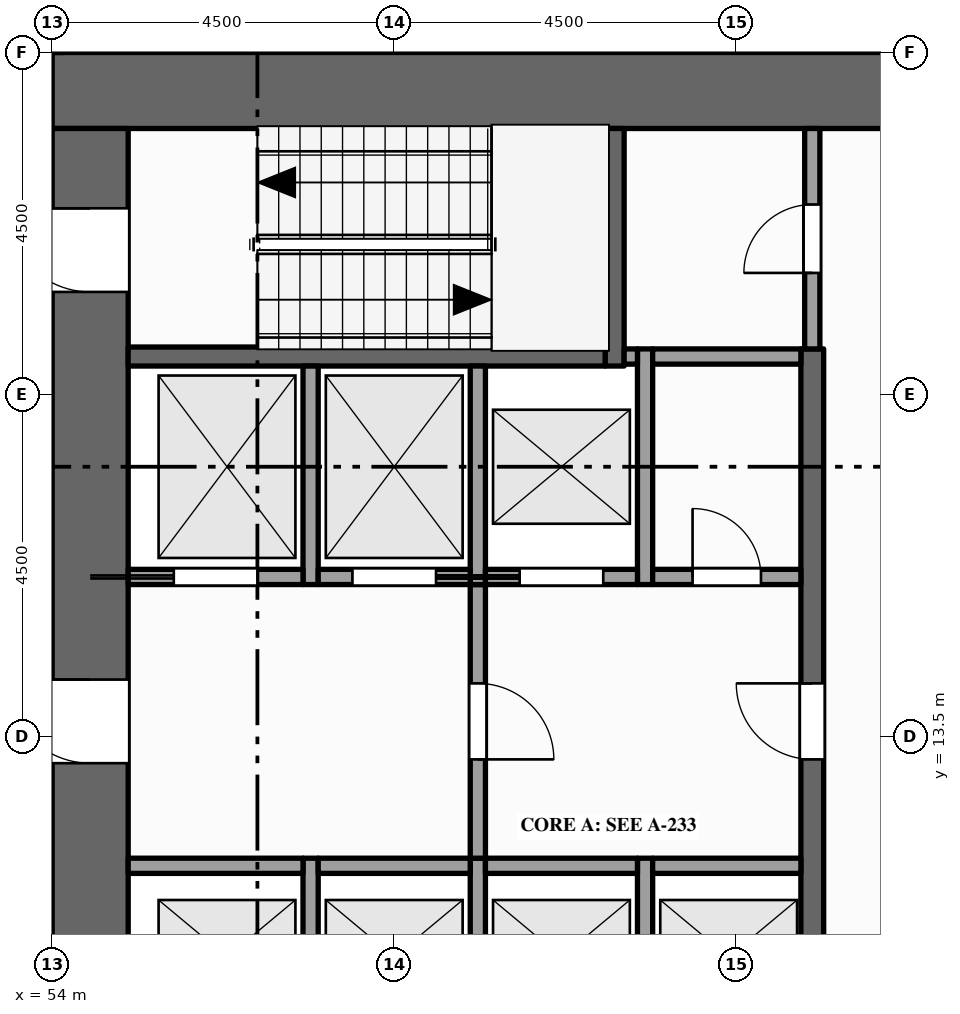
"""IFC4 building model, lengths in metres.
Left out: names, types, materials, properties, quantities, classifications, styles, units other than length and angle.
Written with IfcOpenShell. Run it as: python <this file> out.ifc"""

import sys

from ifc_helpers import new_model, si_unit, direction, frame, frame_2d, origin, place, context, subcontext, project, spatial, rectangle, extrude, element, fill, save


model = new_model("IFC4")
c1 = context("Model", 3, precision=1e-05, world=origin(), true_north=direction((0.0, 1.0)))
c2 = subcontext(c1, "Body", "Model", "MODEL_VIEW")
j1 = project(units=[si_unit("LENGTHUNIT", "METRE"), si_unit("PLANEANGLEUNIT", "RADIAN")], contexts=[c1])
p1 = place(None, origin())
s1 = spatial("IfcSite", under=j1, at=p1, CompositionType="ELEMENT")
p2 = place(p1, origin())
s2 = spatial("IfcBuilding", under=s1, at=p2, CompositionType="ELEMENT")
p3 = place(p2, frame((0.0, 0.0, 183.0)))
s3 = spatial("IfcBuildingStorey", under=s2, at=p3, CompositionType="ELEMENT", Elevation=183.0)
p4 = place(p3, frame((54.0, 22.0, -0.15), z_axis=(0.0, 0.0, 1.0), x_axis=(1.0, 0.0, 0.0)))
e1 = element("IfcWall", 1, at=p4, inside=s3, PredefinedType="SHEAR", context=c2, shape_type="SweptSolid", body=[
    extrude(rectangle(XDim=13.5, YDim=1.0, at=frame_2d((6.75, 0.0))), origin(), (0.0, 0.0, 1.0), 4.0),
])
p5 = place(p3, frame((54.5, 1.0, -0.15), z_axis=(0.0, 0.0, 1.0), x_axis=(0.0, 1.0, 0.0)))
e2 = element("IfcWall", 2, at=p5, inside=s3, PredefinedType="SHEAR", context=c2, shape_type="SweptSolid", body=[
    extrude(rectangle(XDim=20.5, YDim=1.0, at=frame_2d((10.25, 0.0))), origin(), (0.0, 0.0, 1.0), 4.0),
])
p6 = place(p5, frame((6.1, 0.0, 0.15)))
e3 = element("IfcOpeningElement", 3, at=p6, cuts=e2, PredefinedType="OPENING", context=c2, shape_type="SweptSolid", body=[
    extrude(rectangle(XDim=1.8, YDim=2.1, at=frame_2d((0.9, 1.05))), frame((0.0, 0.51, 0.0), z_axis=(0.0, -1.0, 0.0), x_axis=(1.0, 0.0, 0.0)), (0.0, 0.0, 1.0), 1.02),
])
p7 = place(p5, frame((12.15, 0.0, 0.15)))
e4 = element("IfcOpeningElement", 4, at=p7, cuts=e2, PredefinedType="OPENING", context=c2, shape_type="SweptSolid", body=[
    extrude(rectangle(XDim=1.1, YDim=2.1, at=frame_2d((0.55, 1.05))), frame((0.0, 0.51, 0.0), z_axis=(0.0, -1.0, 0.0), x_axis=(1.0, 0.0, 0.0)), (0.0, 0.0, 1.0), 1.02),
])
p8 = place(p5, frame((1.15, 0.0, 0.15)))
e5 = element("IfcOpeningElement", 5, at=p8, cuts=e2, PredefinedType="OPENING", context=c2, shape_type="SweptSolid", body=[
    extrude(rectangle(XDim=1.1, YDim=2.1, at=frame_2d((0.55, 1.05))), frame((0.0, 0.51, 0.0), z_axis=(0.0, -1.0, 0.0), x_axis=(1.0, 0.0, 0.0)), (0.0, 0.0, 1.0), 1.02),
])
p9 = place(p5, frame((18.35, 0.0, 0.15)))
e6 = element("IfcOpeningElement", 6, at=p9, cuts=e2, PredefinedType="OPENING", context=c2, shape_type="SweptSolid", body=[
    extrude(rectangle(XDim=1.1, YDim=2.1, at=frame_2d((0.55, 1.05))), frame((0.0, 0.51, 0.0), z_axis=(0.0, -1.0, 0.0), x_axis=(1.0, 0.0, 0.0)), (0.0, 0.0, 1.0), 1.02),
])
p10 = place(p3, frame((54.0, 22.5, 0.0), z_axis=(0.0, 0.0, 1.0), x_axis=(0.0, 1.0, 0.0)))
e7 = element("IfcWall", 7, at=p10, inside=s3, PredefinedType="STANDARD", context=c2, shape_type="SweptSolid", body=[
    extrude(rectangle(XDim=1.05, YDim=0.3, at=frame_2d((0.525, 0.0))), origin(), (0.0, 0.0, 1.0), 3.049),
])
p11 = place(p3, frame((57.4, 9.3, 0.0), z_axis=(0.0, 0.0, 1.0), x_axis=(0.0, 1.0, 0.0)))
e8 = element("IfcWall", 8, at=p11, inside=s3, PredefinedType="SOLIDWALL", context=c2, shape_type="SweptSolid", body=[
    extrude(rectangle(XDim=2.6, YDim=0.2, at=frame_2d((1.3, 0.0))), origin(), (0.0, 0.0, 1.0), 3.75),
])
p12 = place(p3, frame((57.4, 15.5, 0.0), z_axis=(0.0, 0.0, 1.0), x_axis=(0.0, 1.0, 0.0)))
e9 = element("IfcWall", 9, at=p12, inside=s3, PredefinedType="SOLIDWALL", context=c2, shape_type="SweptSolid", body=[
    extrude(rectangle(XDim=2.875, YDim=0.2, at=frame_2d((1.438, 0.0))), origin(), (0.0, 0.0, 1.0), 3.75),
])
p13 = place(p3, frame((59.6, 9.3, 0.0), z_axis=(0.0, 0.0, 1.0), x_axis=(0.0, 1.0, 0.0)))
e10 = element("IfcWall", 10, at=p13, inside=s3, PredefinedType="SOLIDWALL", context=c2, shape_type="SweptSolid", body=[
    extrude(rectangle(XDim=2.6, YDim=0.2, at=frame_2d((1.3, 0.0))), origin(), (0.0, 0.0, 1.0), 3.75),
])
p14 = place(p3, frame((59.6, 11.9, 0.0), z_axis=(0.0, 0.0, 1.0), x_axis=(0.0, 1.0, 0.0)))
e11 = element("IfcWall", 11, at=p14, inside=s3, PredefinedType="PARTITIONING", context=c2, shape_type="SweptSolid", body=[
    extrude(rectangle(XDim=3.6, YDim=0.2, at=frame_2d((1.8, 0.0))), origin(), (0.0, 0.0, 1.0), 3.75),
])
p15 = place(p14, frame((1.3, 0.0, 0.0)))
e12 = element("IfcOpeningElement", 12, at=p15, cuts=e11, PredefinedType="OPENING", context=c2, shape_type="SweptSolid", body=[
    extrude(rectangle(XDim=1.0, YDim=2.1, at=frame_2d((0.5, 1.05))), frame((0.0, 0.11, 0.0), z_axis=(0.0, -1.0, 0.0), x_axis=(1.0, 0.0, 0.0)), (0.0, 0.0, 1.0), 0.22),
])
p16 = place(p3, frame((59.6, 15.5, 0.0), z_axis=(0.0, 0.0, 1.0), x_axis=(0.0, 1.0, 0.0)))
e13 = element("IfcWall", 13, at=p16, inside=s3, PredefinedType="SOLIDWALL", context=c2, shape_type="SweptSolid", body=[
    extrude(rectangle(XDim=2.875, YDim=0.2, at=frame_2d((1.438, 0.0))), origin(), (0.0, 0.0, 1.0), 3.75),
])
p17 = place(p3, frame((61.4, 18.375, 0.0), z_axis=(0.0, 0.0, 1.0), x_axis=(0.0, 1.0, 0.0)))
e14 = element("IfcWall", 14, at=p17, inside=s3, PredefinedType="SHEAR", context=c2, shape_type="SweptSolid", body=[
    extrude(rectangle(XDim=3.125, YDim=0.25, at=frame_2d((1.562, 0.0))), origin(), (0.0, 0.0, 1.0), 3.75),
])
p18 = place(p3, frame((61.8, 9.3, 0.0), z_axis=(0.0, 0.0, 1.0), x_axis=(0.0, 1.0, 0.0)))
e15 = element("IfcWall", 15, at=p18, inside=s3, PredefinedType="SOLIDWALL", context=c2, shape_type="SweptSolid", body=[
    extrude(rectangle(XDim=2.6, YDim=0.2, at=frame_2d((1.3, 0.0))), origin(), (0.0, 0.0, 1.0), 3.75),
])
p19 = place(p3, frame((61.8, 15.5, 0.0), z_axis=(0.0, 0.0, 1.0), x_axis=(0.0, 1.0, 0.0)))
e16 = element("IfcWall", 16, at=p19, inside=s3, PredefinedType="SOLIDWALL", context=c2, shape_type="SweptSolid", body=[
    extrude(rectangle(XDim=3.1, YDim=0.2, at=frame_2d((1.55, 0.0))), origin(), (0.0, 0.0, 1.0), 3.75),
])
p20 = place(p3, frame((64.0, 4.1, 0.0), z_axis=(0.0, 0.0, 1.0), x_axis=(0.0, 1.0, 0.0)))
e17 = element("IfcWall", 17, at=p20, inside=s3, PredefinedType="SHEAR", context=c2, shape_type="SweptSolid", body=[
    extrude(rectangle(XDim=14.5, YDim=0.3, at=frame_2d((7.25, 0.0))), origin(), (0.0, 0.0, 1.0), 3.75),
])
p21 = place(p20, frame((3.4, 0.0, 0.0)))
e18 = element("IfcOpeningElement", 18, at=p21, cuts=e17, PredefinedType="OPENING", context=c2, shape_type="SweptSolid", body=[
    extrude(rectangle(XDim=1.0, YDim=2.1, at=frame_2d((0.5, 1.05))), frame((0.0, 0.16, 0.0), z_axis=(0.0, -1.0, 0.0), x_axis=(1.0, 0.0, 0.0)), (0.0, 0.0, 1.0), 0.32),
])
p22 = place(p20, frame((9.1, 0.0, 0.0)))
e19 = element("IfcOpeningElement", 19, at=p22, cuts=e17, PredefinedType="OPENING", context=c2, shape_type="SweptSolid", body=[
    extrude(rectangle(XDim=1.0, YDim=2.1, at=frame_2d((0.5, 1.05))), frame((0.0, 0.16, 0.0), z_axis=(0.0, -1.0, 0.0), x_axis=(1.0, 0.0, 0.0)), (0.0, 0.0, 1.0), 0.32),
])
p23 = place(p3, frame((64.0, 18.6, 0.0), z_axis=(0.0, 0.0, 1.0), x_axis=(0.0, 1.0, 0.0)))
e20 = element("IfcWall", 20, at=p23, inside=s3, PredefinedType="PARTITIONING", context=c2, shape_type="SweptSolid", body=[
    extrude(rectangle(XDim=2.9, YDim=0.2, at=frame_2d((1.45, 0.0))), origin(), (0.0, 0.0, 1.0), 3.75),
])
p24 = place(p23, frame((1.0, 0.0, 0.0)))
e21 = element("IfcOpeningElement", 21, at=p24, cuts=e20, PredefinedType="OPENING", context=c2, shape_type="SweptSolid", body=[
    extrude(rectangle(XDim=0.9, YDim=2.1, at=frame_2d((0.45, 1.05))), frame((0.0, 0.11, 0.0), z_axis=(0.0, -1.0, 0.0), x_axis=(1.0, 0.0, 0.0)), (0.0, 0.0, 1.0), 0.22),
])
p25 = place(p3, frame((55.0, 11.8, 0.0), z_axis=(0.0, 0.0, 1.0), x_axis=(1.0, 0.0, 0.0)))
e22 = element("IfcWall", 22, at=p25, inside=s3, PredefinedType="SOLIDWALL", context=c2, shape_type="SweptSolid", body=[
    extrude(rectangle(XDim=2.3, YDim=0.2, at=frame_2d((1.15, 0.0))), origin(), (0.0, 0.0, 1.0), 3.75),
])
for number, where, z_axis, x_axis in (
    (23, (57.5, 11.8, 0.0), (0.0, 0.0, 1.0), (1.0, 0.0, 0.0)),
    (24, (59.7, 11.8, 0.0), (0.0, 0.0, 1.0), (1.0, 0.0, 0.0)),
):
    element("IfcWall", number, at=place(p3, frame(where, z_axis=z_axis, x_axis=x_axis)), inside=s3, PredefinedType="SOLIDWALL", context=c2, shape_type="SweptSolid", body=[
        extrude(rectangle(XDim=2.0, YDim=0.2, at=frame_2d((1.0, 0.0))), origin(), (0.0, 0.0, 1.0), 3.75),
    ])
p26 = place(p3, frame((61.9, 11.8, 0.0), z_axis=(0.0, 0.0, 1.0), x_axis=(1.0, 0.0, 0.0)))
e25 = element("IfcWall", 25, at=p26, inside=s3, PredefinedType="SOLIDWALL", context=c2, shape_type="SweptSolid", body=[
    extrude(rectangle(XDim=1.95, YDim=0.2, at=frame_2d((0.975, 0.0))), origin(), (0.0, 0.0, 1.0), 3.75),
])
p27 = place(p3, frame((55.0, 15.6, 0.0), z_axis=(0.0, 0.0, 1.0), x_axis=(1.0, 0.0, 0.0)))
e26 = element("IfcWall", 26, at=p27, inside=s3, PredefinedType="SOLIDWALL", context=c2, shape_type="SweptSolid", body=[
    extrude(rectangle(XDim=2.3, YDim=0.2, at=frame_2d((1.15, 0.0))), origin(), (0.0, 0.0, 1.0), 3.75),
])
p28 = place(p27, frame((0.6, 0.0, 0.012)))
e27 = element("IfcOpeningElement", 27, at=p28, cuts=e26, PredefinedType="OPENING", context=c2, shape_type="SweptSolid", body=[
    extrude(rectangle(XDim=1.1, YDim=2.1, at=frame_2d((0.55, 1.05))), frame((0.0, 0.11, 0.0), z_axis=(0.0, -1.0, 0.0), x_axis=(1.0, 0.0, 0.0)), (0.0, 0.0, 1.0), 0.22),
])
p29 = place(p3, frame((57.5, 15.6, 0.0), z_axis=(0.0, 0.0, 1.0), x_axis=(1.0, 0.0, 0.0)))
e28 = element("IfcWall", 28, at=p29, inside=s3, PredefinedType="SOLIDWALL", context=c2, shape_type="SweptSolid", body=[
    extrude(rectangle(XDim=2.0, YDim=0.2, at=frame_2d((1.0, 0.0))), origin(), (0.0, 0.0, 1.0), 3.75),
])
p30 = place(p29, frame((0.45, 0.0, 0.012)))
e29 = element("IfcOpeningElement", 29, at=p30, cuts=e28, PredefinedType="OPENING", context=c2, shape_type="SweptSolid", body=[
    extrude(rectangle(XDim=1.1, YDim=2.1, at=frame_2d((0.55, 1.05))), frame((0.0, 0.11, 0.0), z_axis=(0.0, -1.0, 0.0), x_axis=(1.0, 0.0, 0.0)), (0.0, 0.0, 1.0), 0.22),
])
p31 = place(p3, frame((59.7, 15.6, 0.0), z_axis=(0.0, 0.0, 1.0), x_axis=(1.0, 0.0, 0.0)))
e30 = element("IfcWall", 30, at=p31, inside=s3, PredefinedType="SOLIDWALL", context=c2, shape_type="SweptSolid", body=[
    extrude(rectangle(XDim=2.0, YDim=0.2, at=frame_2d((1.0, 0.0))), origin(), (0.0, 0.0, 1.0), 3.75),
])
p32 = place(p31, frame((0.45, 0.0, 0.012)))
e31 = element("IfcOpeningElement", 31, at=p32, cuts=e30, PredefinedType="OPENING", context=c2, shape_type="SweptSolid", body=[
    extrude(rectangle(XDim=1.1, YDim=2.1, at=frame_2d((0.55, 1.05))), frame((0.0, 0.11, 0.0), z_axis=(0.0, -1.0, 0.0), x_axis=(1.0, 0.0, 0.0)), (0.0, 0.0, 1.0), 0.22),
])
p33 = place(p3, frame((61.9, 15.6, 0.0), z_axis=(0.0, 0.0, 1.0), x_axis=(1.0, 0.0, 0.0)))
e32 = element("IfcWall", 32, at=p33, inside=s3, PredefinedType="PARTITIONING", context=c2, shape_type="SweptSolid", body=[
    extrude(rectangle(XDim=1.95, YDim=0.2, at=frame_2d((0.975, 0.0))), origin(), (0.0, 0.0, 1.0), 3.75),
])
p34 = place(p33, frame((0.525, 0.0, 0.0)))
e33 = element("IfcOpeningElement", 33, at=p34, cuts=e32, PredefinedType="OPENING", context=c2, shape_type="SweptSolid", body=[
    extrude(rectangle(XDim=0.9, YDim=2.1, at=frame_2d((0.45, 1.05))), frame((0.0, 0.11, 0.0), z_axis=(0.0, -1.0, 0.0), x_axis=(1.0, 0.0, 0.0)), (0.0, 0.0, 1.0), 0.22),
])
p35 = place(p3, frame((55.0, 18.5, 0.0), z_axis=(0.0, 0.0, 1.0), x_axis=(1.0, 0.0, 0.0)))
e34 = element("IfcWall", 34, at=p35, inside=s3, PredefinedType="SHEAR", context=c2, shape_type="SweptSolid", body=[
    extrude(rectangle(XDim=6.275, YDim=0.25, at=frame_2d((3.137, 0.0))), origin(), (0.0, 0.0, 1.0), 3.75),
])
p36 = place(p3, frame((61.525, 18.5, 0.0), z_axis=(0.0, 0.0, 1.0), x_axis=(1.0, 0.0, 0.0)))
e35 = element("IfcWall", 35, at=p36, inside=s3, PredefinedType="SOLIDWALL", context=c2, shape_type="SweptSolid", body=[
    extrude(rectangle(XDim=0.175, YDim=0.2, at=frame_2d((0.087, 0.0))), origin(), (0.0, 0.0, 1.0), 3.75),
])
p37 = place(p3, frame((61.9, 18.5, 0.0), z_axis=(0.0, 0.0, 1.0), x_axis=(1.0, 0.0, 0.0)))
e36 = element("IfcWall", 36, at=p37, inside=s3, PredefinedType="PARTITIONING", context=c2, shape_type="SweptSolid", body=[
    extrude(rectangle(XDim=1.95, YDim=0.2, at=frame_2d((0.975, 0.0))), origin(), (0.0, 0.0, 1.0), 3.75),
])
p38 = place(p28, origin())
e37 = element("IfcDoor", 37, at=p38, inside=s3, OperationType="SLIDING_TO_LEFT", PredefinedType="DOOR", context=c2, shape_type="SweptSolid", body=[
    extrude(rectangle(XDim=1.1, YDim=2.1, at=frame_2d((0.55, 1.05))), frame((0.0, 0.025, 0.0), z_axis=(0.0, -1.0, 0.0), x_axis=(1.0, 0.0, 0.0)), (0.0, 0.0, 1.0), 0.05),
])
fill(e27, e37)
p39 = place(p30, origin())
e38 = element("IfcDoor", 38, at=p39, inside=s3, OperationType="SLIDING_TO_RIGHT", PredefinedType="DOOR", context=c2, shape_type="SweptSolid", body=[
    extrude(rectangle(XDim=1.1, YDim=2.1, at=frame_2d((0.55, 1.05))), frame((0.0, 0.025, 0.0), z_axis=(0.0, -1.0, 0.0), x_axis=(1.0, 0.0, 0.0)), (0.0, 0.0, 1.0), 0.05),
])
fill(e29, e38)
p40 = place(p32, origin())
e39 = element("IfcDoor", 39, at=p40, inside=s3, OperationType="SLIDING_TO_LEFT", PredefinedType="DOOR", context=c2, shape_type="SweptSolid", body=[
    extrude(rectangle(XDim=1.1, YDim=2.1, at=frame_2d((0.55, 1.05))), frame((0.0, 0.025, 0.0), z_axis=(0.0, -1.0, 0.0), x_axis=(1.0, 0.0, 0.0)), (0.0, 0.0, 1.0), 0.05),
])
fill(e31, e39)
p41 = place(p7, origin())
e40 = element("IfcDoor", 40, at=p41, inside=s3, OperationType="SINGLE_SWING_RIGHT", PredefinedType="DOOR", context=c2, shape_type="SweptSolid", body=[
    extrude(rectangle(XDim=1.1, YDim=2.1, at=frame_2d((0.55, 1.05))), frame((0.0, 0.025, 0.0), z_axis=(0.0, -1.0, 0.0), x_axis=(1.0, 0.0, 0.0)), (0.0, 0.0, 1.0), 0.05),
])
fill(e4, e40)
p42 = place(p15, origin())
e41 = element("IfcDoor", 41, at=p42, inside=s3, OperationType="SINGLE_SWING_LEFT", PredefinedType="DOOR", context=c2, shape_type="SweptSolid", body=[
    extrude(rectangle(XDim=1.0, YDim=2.1, at=frame_2d((0.5, 1.05))), frame((0.0, 0.025, 0.0), z_axis=(0.0, -1.0, 0.0), x_axis=(1.0, 0.0, 0.0)), (0.0, 0.0, 1.0), 0.05),
])
fill(e12, e41)
p43 = place(p22, origin())
e42 = element("IfcDoor", 42, at=p43, inside=s3, OperationType="SINGLE_SWING_RIGHT", PredefinedType="DOOR", context=c2, shape_type="SweptSolid", body=[
    extrude(rectangle(XDim=1.0, YDim=2.1, at=frame_2d((0.5, 1.05))), frame((0.0, 0.025, 0.0), z_axis=(0.0, -1.0, 0.0), x_axis=(1.0, 0.0, 0.0)), (0.0, 0.0, 1.0), 0.05),
])
fill(e19, e42)
p44 = place(p9, origin())
e43 = element("IfcDoor", 43, at=p44, inside=s3, OperationType="SINGLE_SWING_RIGHT", PredefinedType="DOOR", context=c2, shape_type="SweptSolid", body=[
    extrude(rectangle(XDim=1.1, YDim=2.1, at=frame_2d((0.55, 1.05))), frame((0.0, 0.025, 0.0), z_axis=(0.0, -1.0, 0.0), x_axis=(1.0, 0.0, 0.0)), (0.0, 0.0, 1.0), 0.05),
])
fill(e6, e43)
p45 = place(p24, origin())
e44 = element("IfcDoor", 44, at=p45, inside=s3, OperationType="SINGLE_SWING_LEFT", PredefinedType="DOOR", context=c2, shape_type="SweptSolid", body=[
    extrude(rectangle(XDim=0.9, YDim=2.1, at=frame_2d((0.45, 1.05))), frame((0.0, 0.025, 0.0), z_axis=(0.0, -1.0, 0.0), x_axis=(1.0, 0.0, 0.0)), (0.0, 0.0, 1.0), 0.05),
])
fill(e21, e44)
p46 = place(p34, origin())
e45 = element("IfcDoor", 45, at=p46, inside=s3, OperationType="SINGLE_SWING_LEFT", PredefinedType="DOOR", context=c2, shape_type="SweptSolid", body=[
    extrude(rectangle(XDim=0.9, YDim=2.1, at=frame_2d((0.45, 1.05))), frame((0.0, 0.025, 0.0), z_axis=(0.0, -1.0, 0.0), x_axis=(1.0, 0.0, 0.0)), (0.0, 0.0, 1.0), 0.05),
])
fill(e33, e45)
save(model, sys.argv[1])
